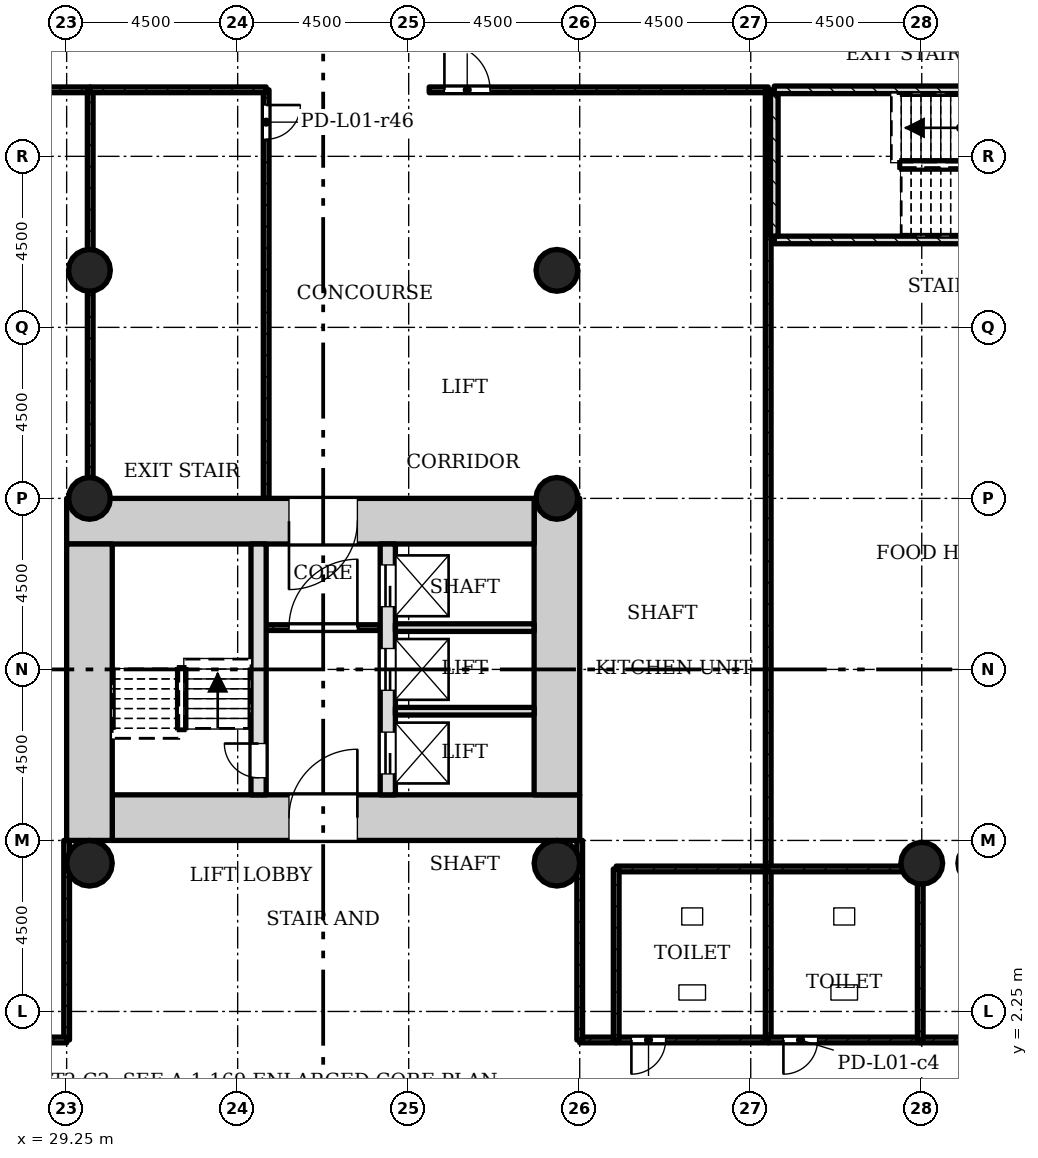
"""IFC4 building model, lengths in metres.
Left out: names, types, materials, properties, quantities, classifications, styles, units other than length and angle.
Written with IfcOpenShell. Run it as: python <this file> out.ifc"""

import sys

from ifc_helpers import new_model, si_unit, direction, frame, frame_2d, origin, origin_2d, place, context, subcontext, project, spatial, rectangle, hollow_circle, extrude, element, fill, save


model = new_model("IFC4")
c1 = context("Model", 3, precision=1e-05, world=origin(), true_north=direction((0.0, 1.0)))
c2 = subcontext(c1, "Body", "Model", "MODEL_VIEW")
j1 = project(units=[si_unit("LENGTHUNIT", "METRE"), si_unit("PLANEANGLEUNIT", "RADIAN")], contexts=[c1])
p1 = place(None, origin())
s1 = spatial("IfcSite", under=j1, at=p1, CompositionType="ELEMENT")
p2 = place(p1, origin())
s2 = spatial("IfcBuilding", under=s1, at=p2, CompositionType="ELEMENT")
p3 = place(p2, frame((0.0, 0.0, 6.0)))
s3 = spatial("IfcBuildingStorey", under=s2, at=p3, CompositionType="ELEMENT", Elevation=6.0)
p4 = place(p3, frame((30.45, 7.35, 0.0), z_axis=(0.0, 0.0, 1.0), x_axis=(1.0, 0.0, 0.0)))
e1 = element("IfcWall", 1, at=p4, inside=s3, PredefinedType="SHEAR", context=c2, shape_type="SweptSolid", body=[
    extrude(rectangle(XDim=12.3, YDim=1.2, at=frame_2d((6.15, 0.0))), origin(), (0.0, 0.0, 1.0), 5.0),
])
p5 = place(p4, frame((4.65, 0.0, 0.0)))
e2 = element("IfcOpeningElement", 2, at=p5, cuts=e1, PredefinedType="OPENING", context=c2, shape_type="SweptSolid", body=[
    extrude(rectangle(XDim=1.8, YDim=2.1, at=frame_2d((0.9, 1.05))), frame((0.0, 0.61, 0.0), z_axis=(0.0, -1.0, 0.0), x_axis=(1.0, 0.0, 0.0)), (0.0, 0.0, 1.0), 1.22),
])
p6 = place(p3, frame((42.15, 7.95, 0.0), z_axis=(0.0, 0.0, 1.0), x_axis=(0.0, 1.0, 0.0)))
e3 = element("IfcWall", 3, at=p6, inside=s3, PredefinedType="SHEAR", context=c2, shape_type="SweptSolid", body=[
    extrude(rectangle(XDim=7.8, YDim=1.2, at=frame_2d((3.9, 0.0))), origin(), (0.0, 0.0, 1.0), 5.0),
])
p7 = place(p3, frame((41.55, 15.15, 0.0), z_axis=(0.0, 0.0, 1.0), x_axis=(-1.0, 0.0, 0.0)))
e4 = element("IfcWall", 4, at=p7, inside=s3, PredefinedType="SHEAR", context=c2, shape_type="SweptSolid", body=[
    extrude(rectangle(XDim=12.3, YDim=1.2, at=frame_2d((6.15, 0.0))), origin(), (0.0, 0.0, 1.0), 5.0),
])
p8 = place(p7, frame((4.65, 0.0, 0.0)))
e5 = element("IfcOpeningElement", 5, at=p8, cuts=e4, PredefinedType="OPENING", context=c2, shape_type="SweptSolid", body=[
    extrude(rectangle(XDim=1.8, YDim=2.1, at=frame_2d((0.9, 1.05))), frame((0.0, 0.61, 0.0), z_axis=(0.0, -1.0, 0.0), x_axis=(1.0, 0.0, 0.0)), (0.0, 0.0, 1.0), 1.22),
])
p9 = place(p3, frame((29.85, 14.55, 0.0), z_axis=(0.0, 0.0, 1.0), x_axis=(0.0, -1.0, 0.0)))
e6 = element("IfcWall", 6, at=p9, inside=s3, PredefinedType="SHEAR", context=c2, shape_type="SweptSolid", body=[
    extrude(rectangle(XDim=7.8, YDim=1.2, at=frame_2d((3.9, 0.0))), origin(), (0.0, 0.0, 1.0), 5.0),
])
p10 = place(p3, frame((34.3, 7.95, 0.0), z_axis=(0.0, 0.0, 1.0), x_axis=(0.0, 1.0, 0.0)))
e7 = element("IfcWall", 7, at=p10, inside=s3, PredefinedType="SHEAR", context=c2, shape_type="SweptSolid", body=[
    extrude(rectangle(XDim=6.6, YDim=0.4, at=frame_2d((3.3, 0.0))), origin(), (0.0, 0.0, 1.0), 5.0),
])
p11 = place(p10, frame((0.45, 0.0, 0.0)))
e8 = element("IfcOpeningElement", 8, at=p11, cuts=e7, PredefinedType="OPENING", context=c2, shape_type="SweptSolid", body=[
    extrude(rectangle(XDim=0.9, YDim=2.1, at=frame_2d((0.45, 1.05))), frame((0.0, 0.21, 0.0), z_axis=(0.0, -1.0, 0.0), x_axis=(1.0, 0.0, 0.0)), (0.0, 0.0, 1.0), 0.42),
])
p12 = place(p3, frame((37.7, 7.95, 0.0), z_axis=(0.0, 0.0, 1.0), x_axis=(0.0, 1.0, 0.0)))
e9 = element("IfcWall", 9, at=p12, inside=s3, PredefinedType="SHEAR", context=c2, shape_type="SweptSolid", body=[
    extrude(rectangle(XDim=6.6, YDim=0.4, at=frame_2d((3.3, 0.0))), origin(), (0.0, 0.0, 1.0), 5.0),
])
p13 = place(p12, frame((0.55, 0.0, 0.0)))
e10 = element("IfcOpeningElement", 10, at=p13, cuts=e9, PredefinedType="OPENING", context=c2, shape_type="SweptSolid", body=[
    extrude(rectangle(XDim=1.1, YDim=2.1, at=frame_2d((0.55, 1.05))), frame((0.0, 0.21, 0.0), z_axis=(0.0, -1.0, 0.0), x_axis=(1.0, 0.0, 0.0)), (0.0, 0.0, 1.0), 0.42),
])
p14 = place(p12, frame((2.75, 0.0, 0.0)))
e11 = element("IfcOpeningElement", 11, at=p14, cuts=e9, PredefinedType="OPENING", context=c2, shape_type="SweptSolid", body=[
    extrude(rectangle(XDim=1.1, YDim=2.1, at=frame_2d((0.55, 1.05))), frame((0.0, 0.21, 0.0), z_axis=(0.0, -1.0, 0.0), x_axis=(1.0, 0.0, 0.0)), (0.0, 0.0, 1.0), 0.42),
])
p15 = place(p12, frame((4.95, 0.0, 0.0)))
e12 = element("IfcOpeningElement", 12, at=p15, cuts=e9, PredefinedType="OPENING", context=c2, shape_type="SweptSolid", body=[
    extrude(rectangle(XDim=1.1, YDim=2.1, at=frame_2d((0.55, 1.05))), frame((0.0, 0.21, 0.0), z_axis=(0.0, -1.0, 0.0), x_axis=(1.0, 0.0, 0.0)), (0.0, 0.0, 1.0), 0.42),
])
for number, where, z_axis, x_axis in (
    (13, (42.15, 15.75, 0.0), (0.0, 0.0, 1.0), (1.0, 0.0, 0.0)),
    (14, (29.85, 15.75, 0.0), (0.0, 0.0, 1.0), (1.0, 0.0, 0.0)),
    (15, (42.15, 21.75, 0.0), (0.0, 0.0, 1.0), (1.0, 0.0, 0.0)),
    (16, (29.85, 21.75, 0.0), (0.0, 0.0, 1.0), (1.0, 0.0, 0.0)),
    (17, (51.75, 6.15, 0.0), (0.0, 0.0, 1.0), (1.0, 0.0, 0.0)),
    (18, (53.25, 6.15, 0.0), (0.0, 0.0, 1.0), (1.0, 0.0, 0.0)),
):
    element("IfcColumn", number, at=place(p3, frame(where, z_axis=z_axis, x_axis=x_axis)), inside=s3, PredefinedType="COLUMN", context=c2, shape_type="SweptSolid", body=[
        extrude(hollow_circle(Radius=0.55, WallThickness=0.04, at=origin_2d()), origin(), (0.0, 0.0, 1.0), 5.0),
    ])
for number, where, z_axis, x_axis in (
    (19, (42.15, 6.15, 0.0), (0.0, 0.0, 1.0), (1.0, 0.0, 0.0)),
    (20, (29.85, 6.15, 0.0), (0.0, 0.0, 1.0), (1.0, 0.0, 0.0)),
):
    element("IfcColumn", number, at=place(p3, frame(where, z_axis=z_axis, x_axis=x_axis)), inside=s3, PredefinedType="COLUMN", context=c2, shape_type="SweptSolid", body=[
        extrude(hollow_circle(Radius=0.6, WallThickness=0.045, at=origin_2d()), origin(), (0.0, 0.0, 1.0), 5.0),
    ])
p16 = place(p3, frame((37.5, 12.35, 0.0), z_axis=(0.0, 0.0, 1.0), x_axis=(-1.0, 0.0, 0.0)))
e21 = element("IfcWall", 21, at=p16, inside=s3, PredefinedType="PARTITIONING", context=c2, shape_type="SweptSolid", body=[
    extrude(rectangle(XDim=3.0, YDim=0.15, at=frame_2d((1.5, 0.0))), origin(), (0.0, 0.0, 1.0), 4.58),
])
p17 = place(p16, frame((0.6, 0.0, 0.0)))
e22 = element("IfcOpeningElement", 22, at=p17, cuts=e21, PredefinedType="OPENING", context=c2, shape_type="SweptSolid", body=[
    extrude(rectangle(XDim=1.8, YDim=2.1, at=frame_2d((0.9, 1.05))), frame((0.0, 0.085, 0.0), z_axis=(0.0, -1.0, 0.0), x_axis=(1.0, 0.0, 0.0)), (0.0, 0.0, 1.0), 0.17),
])
for number, where, z_axis, x_axis in (
    (23, (41.55, 10.15, 0.0), (0.0, 0.0, 1.0), (-1.0, 0.0, 0.0)),
    (24, (41.55, 12.35, 0.0), (0.0, 0.0, 1.0), (-1.0, 0.0, 0.0)),
):
    element("IfcWall", number, at=place(p3, frame(where, z_axis=z_axis, x_axis=x_axis)), inside=s3, PredefinedType="SOLIDWALL", context=c2, shape_type="SweptSolid", body=[
        extrude(rectangle(XDim=3.65, YDim=0.2, at=frame_2d((1.825, 0.0))), origin(), (0.0, 0.0, 1.0), 4.58),
    ])
p18 = place(p3, frame((20.95, 26.5, 0.0), z_axis=(0.0, 0.0, 1.0), x_axis=(1.0, 0.0, 0.0)))
e25 = element("IfcWall", 25, at=p18, inside=s3, PredefinedType="PARTITIONING", context=c2, shape_type="SweptSolid", body=[
    extrude(rectangle(XDim=8.92, YDim=0.15, at=frame_2d((4.46, 0.0))), origin(), (0.0, 0.0, 1.0), 4.58),
])
p19 = place(p18, frame((0.4, 0.0, 0.0)))
e26 = element("IfcOpeningElement", 26, at=p19, cuts=e25, PredefinedType="OPENING", context=c2, shape_type="SweptSolid", body=[
    extrude(rectangle(XDim=1.2, YDim=2.1, at=frame_2d((0.6, 1.05))), frame((0.0, 0.085, 0.0), z_axis=(0.0, -1.0, 0.0), x_axis=(1.0, 0.0, 0.0)), (0.0, 0.0, 1.0), 0.17),
])
p20 = place(p3, frame((29.25, 6.75, 0.0), z_axis=(0.0, 0.0, 1.0), x_axis=(0.0, -1.0, 0.0)))
e27 = element("IfcWall", 27, at=p20, inside=s3, PredefinedType="PARTITIONING", context=c2, shape_type="SweptSolid", body=[
    extrude(rectangle(XDim=5.25, YDim=0.15, at=frame_2d((2.625, 0.0))), origin(), (0.0, 0.0, 1.0), 4.58),
])
p21 = place(p3, frame((29.25, 1.5, 0.0), z_axis=(0.0, 0.0, 1.0), x_axis=(-1.0, 0.0, 0.0)))
e28 = element("IfcWall", 28, at=p21, inside=s3, PredefinedType="PARTITIONING", context=c2, shape_type="SweptSolid", body=[
    extrude(rectangle(XDim=8.3, YDim=0.15, at=frame_2d((4.15, 0.0))), origin(), (0.0, 0.0, 1.0), 4.58),
])
p22 = place(p3, frame((29.87, 26.5, 0.0), z_axis=(0.0, 0.0, 1.0), x_axis=(0.0, -1.0, 0.0)))
e29 = element("IfcWall", 29, at=p22, inside=s3, PredefinedType="PARTITIONING", context=c2, shape_type="SweptSolid", body=[
    extrude(rectangle(XDim=10.75, YDim=0.15, at=frame_2d((5.375, 0.0))), origin(), (0.0, 0.0, 1.0), 4.58),
])
p23 = place(p3, frame((34.5, 26.5, 0.0), z_axis=(0.0, 0.0, 1.0), x_axis=(0.0, -1.0, 0.0)))
e30 = element("IfcWall", 30, at=p23, inside=s3, PredefinedType="PARTITIONING", context=c2, shape_type="SweptSolid", body=[
    extrude(rectangle(XDim=10.75, YDim=0.15, at=frame_2d((5.375, 0.0))), origin(), (0.0, 0.0, 1.0), 4.58),
])
p24 = place(p23, frame((0.4, 0.0, 0.0)))
e31 = element("IfcOpeningElement", 31, at=p24, cuts=e30, PredefinedType="OPENING", context=c2, shape_type="SweptSolid", body=[
    extrude(rectangle(XDim=0.9, YDim=2.1, at=frame_2d((0.45, 1.05))), frame((0.0, 0.085, 0.0), z_axis=(0.0, -1.0, 0.0), x_axis=(1.0, 0.0, 0.0)), (0.0, 0.0, 1.0), 0.17),
])
p25 = place(p3, frame((29.87, 26.5, 0.0), z_axis=(0.0, 0.0, 1.0), x_axis=(1.0, 0.0, 0.0)))
e32 = element("IfcWall", 32, at=p25, inside=s3, PredefinedType="PARTITIONING", context=c2, shape_type="SweptSolid", body=[
    extrude(rectangle(XDim=4.63, YDim=0.15, at=frame_2d((2.315, 0.0))), origin(), (0.0, 0.0, 1.0), 4.58),
])
p26 = place(p3, frame((43.71, 1.5, 0.0), z_axis=(0.0, 0.0, 1.0), x_axis=(-1.0, 0.0, 0.0)))
e33 = element("IfcWall", 33, at=p26, inside=s3, PredefinedType="PARTITIONING", context=c2, shape_type="SweptSolid", body=[
    extrude(rectangle(XDim=0.96, YDim=0.15, at=frame_2d((0.48, 0.0))), origin(), (0.0, 0.0, 1.0), 4.58),
])
p27 = place(p3, frame((42.75, 1.5, 0.0), z_axis=(0.0, 0.0, 1.0), x_axis=(0.0, 1.0, 0.0)))
e34 = element("IfcWall", 34, at=p27, inside=s3, PredefinedType="PARTITIONING", context=c2, shape_type="SweptSolid", body=[
    extrude(rectangle(XDim=5.25, YDim=0.15, at=frame_2d((2.625, 0.0))), origin(), (0.0, 0.0, 1.0), 4.58),
])
p28 = place(p3, frame((38.79, 26.5, 0.0), z_axis=(0.0, 0.0, 1.0), x_axis=(1.0, 0.0, 0.0)))
e35 = element("IfcWall", 35, at=p28, inside=s3, PredefinedType="PARTITIONING", context=c2, shape_type="SweptSolid", body=[
    extrude(rectangle(XDim=8.92, YDim=0.15, at=frame_2d((4.46, 0.0))), origin(), (0.0, 0.0, 1.0), 4.58),
])
p29 = place(p28, frame((0.4, 0.0, 0.0)))
e36 = element("IfcOpeningElement", 36, at=p29, cuts=e35, PredefinedType="OPENING", context=c2, shape_type="SweptSolid", body=[
    extrude(rectangle(XDim=1.2, YDim=2.1, at=frame_2d((0.6, 1.05))), frame((0.0, 0.085, 0.0), z_axis=(0.0, -1.0, 0.0), x_axis=(1.0, 0.0, 0.0)), (0.0, 0.0, 1.0), 0.17),
])
p30 = place(p3, frame((47.71, 26.5, 0.0), z_axis=(0.0, 0.0, 1.0), x_axis=(0.0, -1.0, 0.0)))
e37 = element("IfcWall", 37, at=p30, inside=s3, PredefinedType="PARTITIONING", context=c2, shape_type="SweptSolid", body=[
    extrude(rectangle(XDim=20.5, YDim=0.15, at=frame_2d((10.25, 0.0))), origin(), (0.0, 0.0, 1.0), 4.58),
])
p31 = place(p3, frame((56.63, 1.5, 0.0), z_axis=(0.0, 0.0, 1.0), x_axis=(-1.0, 0.0, 0.0)))
e38 = element("IfcWall", 38, at=p31, inside=s3, PredefinedType="PARTITIONING", context=c2, shape_type="SweptSolid", body=[
    extrude(rectangle(XDim=4.92, YDim=0.15, at=frame_2d((2.46, 0.0))), origin(), (0.0, 0.0, 1.0), 4.58),
])
p32 = place(p31, frame((0.4, 0.0, 0.0)))
e39 = element("IfcOpeningElement", 39, at=p32, cuts=e38, PredefinedType="OPENING", context=c2, shape_type="SweptSolid", body=[
    extrude(rectangle(XDim=1.2, YDim=2.1, at=frame_2d((0.6, 1.05))), frame((0.0, 0.085, 0.0), z_axis=(0.0, -1.0, 0.0), x_axis=(1.0, 0.0, 0.0)), (0.0, 0.0, 1.0), 0.17),
])
p33 = place(p3, frame((43.71, 1.5, 0.0), z_axis=(0.0, 0.0, 1.0), x_axis=(1.0, 0.0, 0.0)))
e40 = element("IfcWall", 40, at=p33, inside=s3, PredefinedType="PARTITIONING", context=c2, shape_type="SweptSolid", body=[
    extrude(rectangle(XDim=4.0, YDim=0.15, at=frame_2d((2.0, 0.0))), origin(), (0.0, 0.0, 1.0), 4.58),
])
p34 = place(p33, frame((0.4, 0.0, 0.0)))
e41 = element("IfcOpeningElement", 41, at=p34, cuts=e40, PredefinedType="OPENING", context=c2, shape_type="SweptSolid", body=[
    extrude(rectangle(XDim=0.9, YDim=2.1, at=frame_2d((0.45, 1.05))), frame((0.0, 0.085, 0.0), z_axis=(0.0, -1.0, 0.0), x_axis=(1.0, 0.0, 0.0)), (0.0, 0.0, 1.0), 0.17),
])
p35 = place(p3, frame((47.71, 6.0, 0.0), z_axis=(0.0, 0.0, 1.0), x_axis=(-1.0, 0.0, 0.0)))
e42 = element("IfcWall", 42, at=p35, inside=s3, PredefinedType="PARTITIONING", context=c2, shape_type="SweptSolid", body=[
    extrude(rectangle(XDim=4.0, YDim=0.15, at=frame_2d((2.0, 0.0))), origin(), (0.0, 0.0, 1.0), 4.58),
])
for number, where, z_axis, x_axis in (
    (43, (43.71, 6.0, 0.0), (0.0, 0.0, 1.0), (0.0, -1.0, 0.0)),
    (44, (47.71, 1.5, 0.0), (0.0, 0.0, 1.0), (0.0, 1.0, 0.0)),
):
    element("IfcWall", number, at=place(p3, frame(where, z_axis=z_axis, x_axis=x_axis)), inside=s3, PredefinedType="PARTITIONING", context=c2, shape_type="SweptSolid", body=[
        extrude(rectangle(XDim=4.5, YDim=0.15, at=frame_2d((2.25, 0.0))), origin(), (0.0, 0.0, 1.0), 4.58),
    ])
p36 = place(p3, frame((47.71, 1.5, 0.0), z_axis=(0.0, 0.0, 1.0), x_axis=(1.0, 0.0, 0.0)))
e45 = element("IfcWall", 45, at=p36, inside=s3, PredefinedType="PARTITIONING", context=c2, shape_type="SweptSolid", body=[
    extrude(rectangle(XDim=4.0, YDim=0.15, at=frame_2d((2.0, 0.0))), origin(), (0.0, 0.0, 1.0), 4.58),
])
p37 = place(p36, frame((0.4, 0.0, 0.0)))
e46 = element("IfcOpeningElement", 46, at=p37, cuts=e45, PredefinedType="OPENING", context=c2, shape_type="SweptSolid", body=[
    extrude(rectangle(XDim=0.9, YDim=2.1, at=frame_2d((0.45, 1.05))), frame((0.0, 0.085, 0.0), z_axis=(0.0, -1.0, 0.0), x_axis=(1.0, 0.0, 0.0)), (0.0, 0.0, 1.0), 0.17),
])
p38 = place(p3, frame((51.71, 1.5, 0.0), z_axis=(0.0, 0.0, 1.0), x_axis=(0.0, 1.0, 0.0)))
e47 = element("IfcWall", 47, at=p38, inside=s3, PredefinedType="PARTITIONING", context=c2, shape_type="SweptSolid", body=[
    extrude(rectangle(XDim=4.5, YDim=0.15, at=frame_2d((2.25, 0.0))), origin(), (0.0, 0.0, 1.0), 4.58),
])
p39 = place(p3, frame((51.71, 6.0, 0.0), z_axis=(0.0, 0.0, 1.0), x_axis=(-1.0, 0.0, 0.0)))
e48 = element("IfcWall", 48, at=p39, inside=s3, PredefinedType="PARTITIONING", context=c2, shape_type="SweptSolid", body=[
    extrude(rectangle(XDim=4.0, YDim=0.15, at=frame_2d((2.0, 0.0))), origin(), (0.0, 0.0, 1.0), 4.58),
])
p40 = place(p3, frame((47.87, 26.5, 0.0), z_axis=(0.0, 0.0, 1.0), x_axis=(1.0, 0.0, 0.0)))
e49 = element("IfcWall", 49, at=p40, inside=s3, PredefinedType="SHEAR", context=c2, shape_type="SweptSolid", body=[
    extrude(rectangle(XDim=6.8, YDim=0.2, at=frame_2d((3.4, 0.0))), origin(), (0.0, 0.0, 1.0), 4.58),
])
p41 = place(p40, frame((5.35, 0.0, 0.0)))
e50 = element("IfcOpeningElement", 50, at=p41, cuts=e49, PredefinedType="OPENING", context=c2, shape_type="SweptSolid", body=[
    extrude(rectangle(XDim=0.9, YDim=2.1, at=frame_2d((0.45, 1.05))), frame((0.0, 0.11, 0.0), z_axis=(0.0, -1.0, 0.0), x_axis=(1.0, 0.0, 0.0)), (0.0, 0.0, 1.0), 0.22),
])
p42 = place(p3, frame((47.87, 22.55, 0.0), z_axis=(0.0, 0.0, 1.0), x_axis=(1.0, 0.0, 0.0)))
e51 = element("IfcWall", 51, at=p42, inside=s3, PredefinedType="SHEAR", context=c2, shape_type="SweptSolid", body=[
    extrude(rectangle(XDim=6.8, YDim=0.2, at=frame_2d((3.4, 0.0))), origin(), (0.0, 0.0, 1.0), 4.58),
])
p43 = place(p3, frame((47.87, 22.65, 0.0), z_axis=(0.0, 0.0, 1.0), x_axis=(0.0, 1.0, 0.0)))
e52 = element("IfcWall", 52, at=p43, inside=s3, PredefinedType="SHEAR", context=c2, shape_type="SweptSolid", body=[
    extrude(rectangle(XDim=3.75, YDim=0.2, at=frame_2d((1.875, 0.0))), origin(), (0.0, 0.0, 1.0), 4.58),
])
p44 = place(p17, origin())
e53 = element("IfcDoor", 53, at=p44, inside=s3, OperationType="SINGLE_SWING_LEFT", PredefinedType="DOOR", context=c2, shape_type="SweptSolid", body=[
    extrude(rectangle(XDim=1.8, YDim=2.1, at=frame_2d((0.9, 1.05))), frame((0.0, 0.025, 0.0), z_axis=(0.0, -1.0, 0.0), x_axis=(1.0, 0.0, 0.0)), (0.0, 0.0, 1.0), 0.05),
])
fill(e22, e53)
p45 = place(p24, origin())
e54 = element("IfcDoor", 54, at=p45, inside=s3, OperationType="SINGLE_SWING_RIGHT", PredefinedType="DOOR", context=c2, shape_type="SweptSolid", body=[
    extrude(rectangle(XDim=0.9, YDim=2.1, at=frame_2d((0.45, 1.05))), frame((0.0, 0.025, 0.0), z_axis=(0.0, -1.0, 0.0), x_axis=(1.0, 0.0, 0.0)), (0.0, 0.0, 1.0), 0.05),
])
fill(e31, e54)
p46 = place(p29, origin())
e55 = element("IfcDoor", 55, at=p46, inside=s3, OperationType="SINGLE_SWING_RIGHT", PredefinedType="DOOR", context=c2, shape_type="SweptSolid", body=[
    extrude(rectangle(XDim=1.2, YDim=2.1, at=frame_2d((0.6, 1.05))), frame((0.0, 0.025, 0.0), z_axis=(0.0, -1.0, 0.0), x_axis=(1.0, 0.0, 0.0)), (0.0, 0.0, 1.0), 0.05),
])
fill(e36, e55)
p47 = place(p34, origin())
e56 = element("IfcDoor", 56, at=p47, inside=s3, OperationType="SINGLE_SWING_LEFT", PredefinedType="DOOR", context=c2, shape_type="SweptSolid", body=[
    extrude(rectangle(XDim=0.9, YDim=2.1, at=frame_2d((0.45, 1.05))), frame((0.0, 0.025, 0.0), z_axis=(0.0, -1.0, 0.0), x_axis=(1.0, 0.0, 0.0)), (0.0, 0.0, 1.0), 0.05),
])
fill(e41, e56)
p48 = place(p37, origin())
e57 = element("IfcDoor", 57, at=p48, inside=s3, OperationType="SINGLE_SWING_LEFT", PredefinedType="DOOR", context=c2, shape_type="SweptSolid", body=[
    extrude(rectangle(XDim=0.9, YDim=2.1, at=frame_2d((0.45, 1.05))), frame((0.0, 0.025, 0.0), z_axis=(0.0, -1.0, 0.0), x_axis=(1.0, 0.0, 0.0)), (0.0, 0.0, 1.0), 0.05),
])
fill(e46, e57)
p49 = place(p11, origin())
e58 = element("IfcDoor", 58, at=p49, inside=s3, OperationType="SINGLE_SWING_LEFT", PredefinedType="DOOR", context=c2, shape_type="SweptSolid", body=[
    extrude(rectangle(XDim=0.9, YDim=2.1, at=frame_2d((0.45, 1.05))), frame((0.0, 0.025, 0.0), z_axis=(0.0, -1.0, 0.0), x_axis=(1.0, 0.0, 0.0)), (0.0, 0.0, 1.0), 0.05),
])
fill(e8, e58)
p50 = place(p13, origin())
e59 = element("IfcDoor", 59, at=p50, inside=s3, OperationType="SLIDING_TO_LEFT", PredefinedType="DOOR", context=c2, shape_type="SweptSolid", body=[
    extrude(rectangle(XDim=1.1, YDim=2.1, at=frame_2d((0.55, 1.05))), frame((0.0, 0.025, 0.0), z_axis=(0.0, -1.0, 0.0), x_axis=(1.0, 0.0, 0.0)), (0.0, 0.0, 1.0), 0.05),
])
fill(e10, e59)
p51 = place(p14, origin())
e60 = element("IfcDoor", 60, at=p51, inside=s3, OperationType="SLIDING_TO_LEFT", PredefinedType="DOOR", context=c2, shape_type="SweptSolid", body=[
    extrude(rectangle(XDim=1.1, YDim=2.1, at=frame_2d((0.55, 1.05))), frame((0.0, 0.025, 0.0), z_axis=(0.0, -1.0, 0.0), x_axis=(1.0, 0.0, 0.0)), (0.0, 0.0, 1.0), 0.05),
])
fill(e11, e60)
p52 = place(p15, origin())
e61 = element("IfcDoor", 61, at=p52, inside=s3, OperationType="SLIDING_TO_LEFT", PredefinedType="DOOR", context=c2, shape_type="SweptSolid", body=[
    extrude(rectangle(XDim=1.1, YDim=2.1, at=frame_2d((0.55, 1.05))), frame((0.0, 0.025, 0.0), z_axis=(0.0, -1.0, 0.0), x_axis=(1.0, 0.0, 0.0)), (0.0, 0.0, 1.0), 0.05),
])
fill(e12, e61)
p53 = place(p5, origin())
e62 = element("IfcDoor", 62, at=p53, inside=s3, OperationType="SINGLE_SWING_LEFT", PredefinedType="DOOR", context=c2, shape_type="SweptSolid", body=[
    extrude(rectangle(XDim=1.8, YDim=2.1, at=frame_2d((0.9, 1.05))), frame((0.0, 0.025, 0.0), z_axis=(0.0, -1.0, 0.0), x_axis=(1.0, 0.0, 0.0)), (0.0, 0.0, 1.0), 0.05),
])
fill(e2, e62)
p54 = place(p8, origin())
e63 = element("IfcDoor", 63, at=p54, inside=s3, OperationType="SINGLE_SWING_LEFT", PredefinedType="DOOR", context=c2, shape_type="SweptSolid", body=[
    extrude(rectangle(XDim=1.8, YDim=2.1, at=frame_2d((0.9, 1.05))), frame((0.0, 0.025, 0.0), z_axis=(0.0, -1.0, 0.0), x_axis=(1.0, 0.0, 0.0)), (0.0, 0.0, 1.0), 0.05),
])
fill(e5, e63)
save(model, sys.argv[1])
